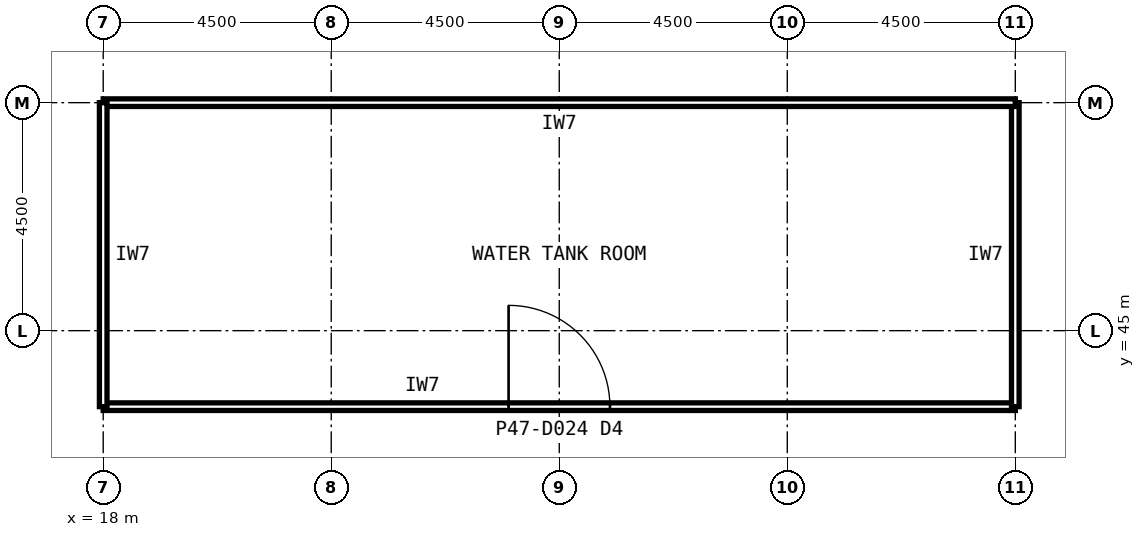
"""IFC4 building model, lengths in metres.
Left out: names, types, materials, properties, quantities, classifications, styles, units other than length and angle.
Written with IfcOpenShell. Run it as: python <this file> out.ifc"""

import sys

from ifc_helpers import new_model, si_unit, direction, frame, frame_2d, origin, place, context, subcontext, project, spatial, rectangle, extrude, element, fill, save


model = new_model("IFC4")
c1 = context("Model", 3, precision=1e-05, world=origin(), true_north=direction((0.0, 1.0)))
c2 = subcontext(c1, "Body", "Model", "MODEL_VIEW")
j1 = project(units=[si_unit("LENGTHUNIT", "METRE"), si_unit("PLANEANGLEUNIT", "RADIAN")], contexts=[c1])
p1 = place(None, origin())
s1 = spatial("IfcSite", under=j1, at=p1, CompositionType="ELEMENT")
p2 = place(p1, origin())
s2 = spatial("IfcBuilding", under=s1, at=p2, CompositionType="ELEMENT")
p3 = place(p2, frame((0.0, 0.0, 199.6)))
s3 = spatial("IfcBuildingStorey", under=s2, at=p3, CompositionType="ELEMENT", Elevation=199.6)
p4 = place(p3, frame((36.261, 54.63, 0.0), z_axis=(0.0, 0.0, 1.0), x_axis=(0.707106781187, -0.707106781187, 0.0)))
e1 = element("IfcWall", 1, at=p4, inside=s3, PredefinedType="SOLIDWALL", context=c2, shape_type="SweptSolid", body=[
    extrude(rectangle(XDim=25.978, YDim=0.3, at=frame_2d((12.989, 0.0))), origin(), (0.0, 0.0, 1.0), 6.0),
])
p5 = place(p4, frame((0.424, 0.0, 1.2)))
e2 = element("IfcOpeningElement", 2, at=p5, cuts=e1, PredefinedType="OPENING", context=c2, shape_type="SweptSolid", body=[
    extrude(rectangle(XDim=2.4, YDim=3.0, at=frame_2d((1.2, 1.5))), frame((0.0, 0.16, 0.0), z_axis=(0.0, -1.0, 0.0), x_axis=(1.0, 0.0, 0.0)), (0.0, 0.0, 1.0), 0.32),
])
p6 = place(p4, frame((3.671, 0.0, 1.2)))
e3 = element("IfcOpeningElement", 3, at=p6, cuts=e1, PredefinedType="OPENING", context=c2, shape_type="SweptSolid", body=[
    extrude(rectangle(XDim=2.4, YDim=3.0, at=frame_2d((1.2, 1.5))), frame((0.0, 0.16, 0.0), z_axis=(0.0, -1.0, 0.0), x_axis=(1.0, 0.0, 0.0)), (0.0, 0.0, 1.0), 0.32),
])
p7 = place(p4, frame((6.918, 0.0, 1.2)))
e4 = element("IfcOpeningElement", 4, at=p7, cuts=e1, PredefinedType="OPENING", context=c2, shape_type="SweptSolid", body=[
    extrude(rectangle(XDim=2.4, YDim=3.0, at=frame_2d((1.2, 1.5))), frame((0.0, 0.16, 0.0), z_axis=(0.0, -1.0, 0.0), x_axis=(1.0, 0.0, 0.0)), (0.0, 0.0, 1.0), 0.32),
])
p8 = place(p4, frame((10.165, 0.0, 1.2)))
e5 = element("IfcOpeningElement", 5, at=p8, cuts=e1, PredefinedType="OPENING", context=c2, shape_type="SweptSolid", body=[
    extrude(rectangle(XDim=2.4, YDim=3.0, at=frame_2d((1.2, 1.5))), frame((0.0, 0.16, 0.0), z_axis=(0.0, -1.0, 0.0), x_axis=(1.0, 0.0, 0.0)), (0.0, 0.0, 1.0), 0.32),
])
p9 = place(p4, frame((13.412, 0.0, 1.2)))
e6 = element("IfcOpeningElement", 6, at=p9, cuts=e1, PredefinedType="OPENING", context=c2, shape_type="SweptSolid", body=[
    extrude(rectangle(XDim=2.4, YDim=3.0, at=frame_2d((1.2, 1.5))), frame((0.0, 0.16, 0.0), z_axis=(0.0, -1.0, 0.0), x_axis=(1.0, 0.0, 0.0)), (0.0, 0.0, 1.0), 0.32),
])
p10 = place(p4, frame((16.66, 0.0, 1.2)))
e7 = element("IfcOpeningElement", 7, at=p10, cuts=e1, PredefinedType="OPENING", context=c2, shape_type="SweptSolid", body=[
    extrude(rectangle(XDim=2.4, YDim=3.0, at=frame_2d((1.2, 1.5))), frame((0.0, 0.16, 0.0), z_axis=(0.0, -1.0, 0.0), x_axis=(1.0, 0.0, 0.0)), (0.0, 0.0, 1.0), 0.32),
])
p11 = place(p4, frame((19.907, 0.0, 1.2)))
e8 = element("IfcOpeningElement", 8, at=p11, cuts=e1, PredefinedType="OPENING", context=c2, shape_type="SweptSolid", body=[
    extrude(rectangle(XDim=2.4, YDim=3.0, at=frame_2d((1.2, 1.5))), frame((0.0, 0.16, 0.0), z_axis=(0.0, -1.0, 0.0), x_axis=(1.0, 0.0, 0.0)), (0.0, 0.0, 1.0), 0.32),
])
p12 = place(p4, frame((23.154, 0.0, 1.2)))
e9 = element("IfcOpeningElement", 9, at=p12, cuts=e1, PredefinedType="OPENING", context=c2, shape_type="SweptSolid", body=[
    extrude(rectangle(XDim=2.4, YDim=3.0, at=frame_2d((1.2, 1.5))), frame((0.0, 0.16, 0.0), z_axis=(0.0, -1.0, 0.0), x_axis=(1.0, 0.0, 0.0)), (0.0, 0.0, 1.0), 0.32),
])
p13 = place(p3, frame((18.0, 43.5, 0.0), z_axis=(0.0, 0.0, 1.0), x_axis=(1.0, 0.0, 0.0)))
e10 = element("IfcWall", 10, at=p13, inside=s3, PredefinedType="PARTITIONING", context=c2, shape_type="SweptSolid", body=[
    extrude(rectangle(XDim=18.0, YDim=0.15, at=frame_2d((9.0, 0.0))), origin(), (0.0, 0.0, 1.0), 5.82),
])
p14 = place(p13, frame((8.0, 0.0, 0.0)))
e11 = element("IfcOpeningElement", 11, at=p14, cuts=e10, PredefinedType="OPENING", context=c2, shape_type="SweptSolid", body=[
    extrude(rectangle(XDim=2.0, YDim=2.4, at=frame_2d((1.0, 1.2))), frame((0.0, 0.085, 0.0), z_axis=(0.0, -1.0, 0.0), x_axis=(1.0, 0.0, 0.0)), (0.0, 0.0, 1.0), 0.17),
])
p15 = place(p3, frame((36.0, 43.5, 0.0), z_axis=(0.0, 0.0, 1.0), x_axis=(0.0, 1.0, 0.0)))
e12 = element("IfcWall", 12, at=p15, inside=s3, PredefinedType="PARTITIONING", context=c2, shape_type="SweptSolid", body=[
    extrude(rectangle(XDim=6.0, YDim=0.15, at=frame_2d((3.0, 0.0))), origin(), (0.0, 0.0, 1.0), 4.72),
])
p16 = place(p3, frame((36.0, 49.5, 0.0), z_axis=(0.0, 0.0, 1.0), x_axis=(-1.0, 0.0, 0.0)))
e13 = element("IfcWall", 13, at=p16, inside=s3, PredefinedType="PARTITIONING", context=c2, shape_type="SweptSolid", body=[
    extrude(rectangle(XDim=18.0, YDim=0.15, at=frame_2d((9.0, 0.0))), origin(), (0.0, 0.0, 1.0), 5.82),
])
p17 = place(p3, frame((18.0, 49.5, 0.0), z_axis=(0.0, 0.0, 1.0), x_axis=(0.0, -1.0, 0.0)))
e14 = element("IfcWall", 14, at=p17, inside=s3, PredefinedType="PARTITIONING", context=c2, shape_type="SweptSolid", body=[
    extrude(rectangle(XDim=6.0, YDim=0.15, at=frame_2d((3.0, 0.0))), origin(), (0.0, 0.0, 1.0), 4.72),
])
p18 = place(p14, origin())
e15 = element("IfcDoor", 15, at=p18, inside=s3, OperationType="SINGLE_SWING_LEFT", PredefinedType="DOOR", context=c2, shape_type="SweptSolid", body=[
    extrude(rectangle(XDim=2.0, YDim=2.4, at=frame_2d((1.0, 1.2))), frame((0.0, 0.025, 0.0), z_axis=(0.0, -1.0, 0.0), x_axis=(1.0, 0.0, 0.0)), (0.0, 0.0, 1.0), 0.05),
])
fill(e11, e15)
save(model, sys.argv[1])
